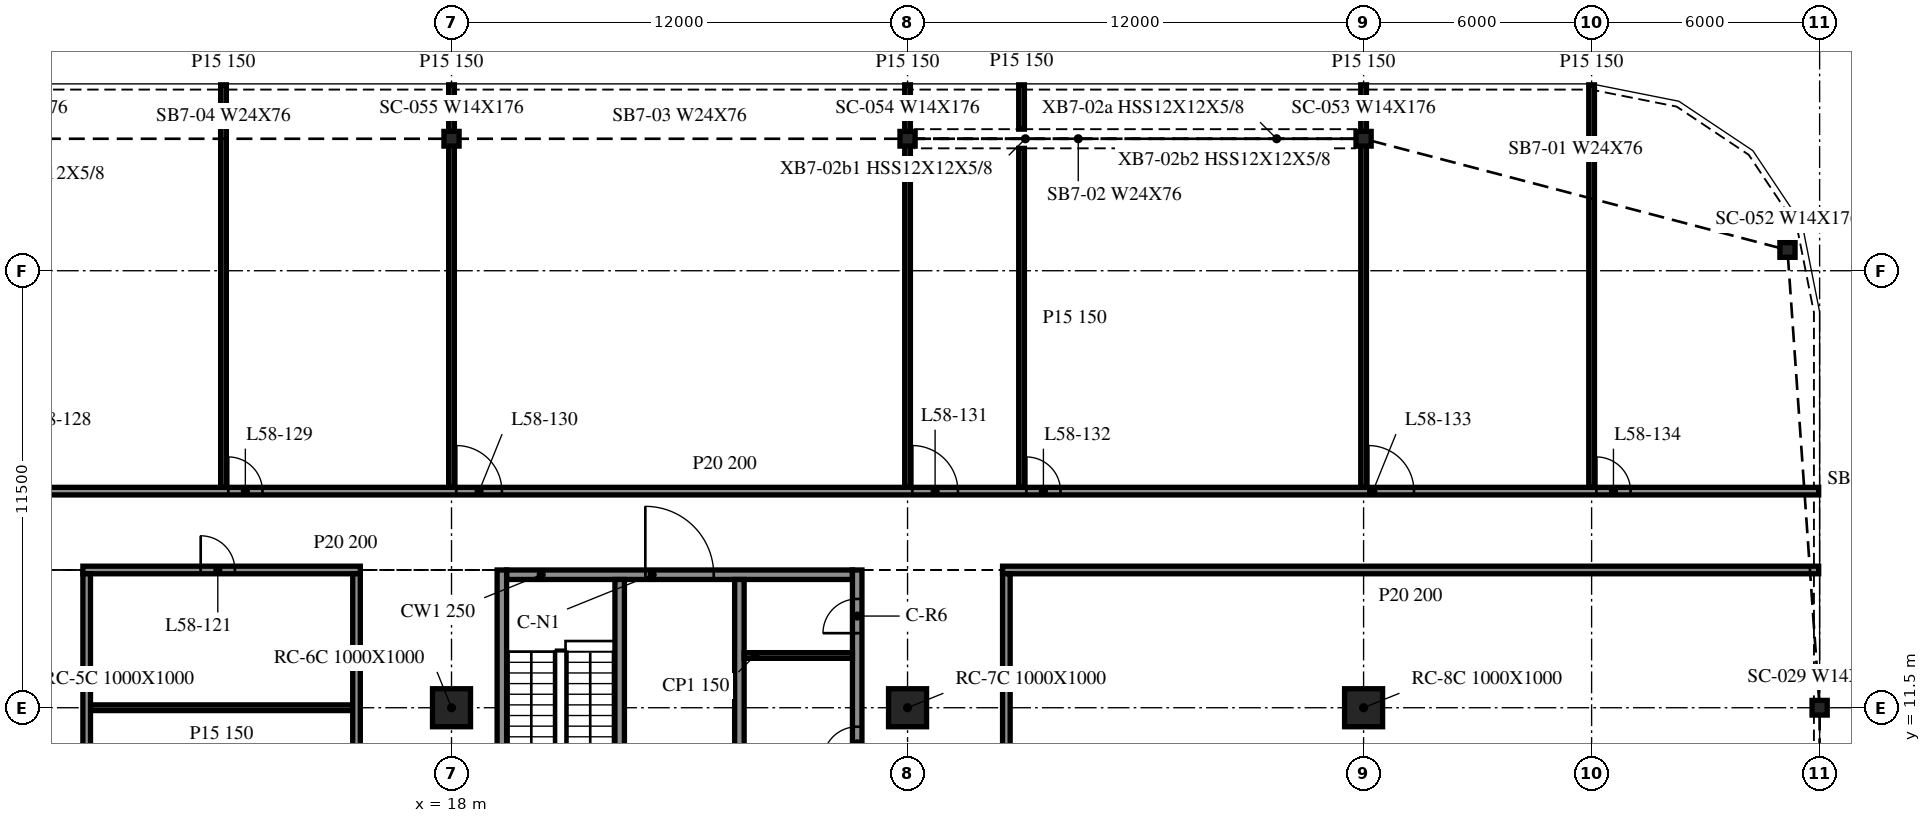
"""IFC4 building model, lengths in metres.
Left out: names, types, materials, properties, quantities, classifications, styles, units other than length and angle.
Written with IfcOpenShell. Run it as: python <this file> out.ifc"""

import sys

from ifc_helpers import new_model, si_unit, direction, frame, frame_2d, origin, origin_2d, place, context, subcontext, project, spatial, rectangle, i_section, extrude, element, fill, save


model = new_model("IFC4")
c1 = context("Model", 3, precision=1e-05, world=origin(), true_north=direction((0.0, 1.0)))
c2 = subcontext(c1, "Body", "Model", "MODEL_VIEW")
j1 = project(units=[si_unit("LENGTHUNIT", "METRE"), si_unit("PLANEANGLEUNIT", "RADIAN")], contexts=[c1])
p1 = place(None, origin())
s1 = spatial("IfcSite", under=j1, at=p1, CompositionType="ELEMENT")
p2 = place(p1, origin())
s2 = spatial("IfcBuilding", under=s1, at=p2, CompositionType="ELEMENT")
p3 = place(p2, frame((0.0, 0.0, 240.0)))
s3 = spatial("IfcBuildingStorey", under=s2, at=p3, CompositionType="ELEMENT", Elevation=240.0)
for number, where, z_axis, x_axis in (
    (1, (18.0, 11.5, -0.34), (0.0, 0.0, 1.0), (1.0, 0.0, 0.0)),
    (2, (30.0, 11.5, -0.34), (0.0, 0.0, 1.0), (1.0, 0.0, 0.0)),
    (3, (42.0, 11.5, -0.34), (0.0, 0.0, 1.0), (1.0, 0.0, 0.0)),
):
    element("IfcColumn", number, at=place(p3, frame(where, z_axis=z_axis, x_axis=x_axis)), inside=s3, PredefinedType="COLUMN", context=c2, shape_type="SweptSolid", body=[
        extrude(rectangle(XDim=1.0, YDim=1.0, at=origin_2d()), origin(), (0.0, 0.0, 1.0), 3.8),
    ])
for number, where, z_axis, x_axis in (
    (4, (53.154, 23.546, -0.34), (0.0, 0.0, 1.0), (1.0, 0.0, 0.0)),
    (5, (42.0, 26.473, -0.34), (0.0, 0.0, 1.0), (1.0, 0.0, 0.0)),
    (6, (30.0, 26.473, -0.34), (0.0, 0.0, 1.0), (1.0, 0.0, 0.0)),
    (7, (18.0, 26.473, -0.34), (0.0, 0.0, 1.0), (1.0, 0.0, 0.0)),
    (8, (54.0, 11.5, -0.34), (0.0, 0.0, 1.0), (1.0, 0.0, 0.0)),
):
    element("IfcColumn", number, at=place(p3, frame(where, z_axis=z_axis, x_axis=x_axis)), inside=s3, PredefinedType="COLUMN", context=c2, shape_type="SweptSolid", body=[
        extrude(i_section(OverallWidth=0.399, OverallDepth=0.386, WebThickness=0.021, FlangeThickness=0.033, at=origin_2d()), origin(), (0.0, 0.0, 1.0), 3.8),
    ])
p4 = place(p3, frame((19.325, 15.125, 0.0), z_axis=(0.0, 0.0, 1.0), x_axis=(0.0, -1.0, 0.0)))
e9 = element("IfcWall", 9, at=p4, inside=s3, PredefinedType="SOLIDWALL", context=c2, shape_type="SweptSolid", body=[
    extrude(rectangle(XDim=24.25, YDim=0.25, at=frame_2d((12.125, 0.0))), origin(), (0.0, 0.0, 1.0), 3.46),
])
p5 = place(p3, frame((28.675, -9.125, 0.0), z_axis=(0.0, 0.0, 1.0), x_axis=(0.0, 1.0, 0.0)))
e10 = element("IfcWall", 10, at=p5, inside=s3, PredefinedType="SOLIDWALL", context=c2, shape_type="SweptSolid", body=[
    extrude(rectangle(XDim=24.25, YDim=0.25, at=frame_2d((12.125, 0.0))), origin(), (0.0, 0.0, 1.0), 3.46),
])
p6 = place(p5, frame((14.425, 0.0, 0.0)))
e11 = element("IfcOpeningElement", 11, at=p6, cuts=e10, PredefinedType="OPENING", context=c2, shape_type="SweptSolid", body=[
    extrude(rectangle(XDim=0.9, YDim=2.1, at=frame_2d((0.45, 1.05))), frame((0.0, 0.135, 0.0), z_axis=(0.0, -1.0, 0.0), x_axis=(1.0, 0.0, 0.0)), (0.0, 0.0, 1.0), 0.27),
])
p7 = place(p5, frame((19.225, 0.0, 0.0)))
e12 = element("IfcOpeningElement", 12, at=p7, cuts=e10, PredefinedType="OPENING", context=c2, shape_type="SweptSolid", body=[
    extrude(rectangle(XDim=0.9, YDim=2.1, at=frame_2d((0.45, 1.05))), frame((0.0, 0.135, 0.0), z_axis=(0.0, -1.0, 0.0), x_axis=(1.0, 0.0, 0.0)), (0.0, 0.0, 1.0), 0.27),
])
p8 = place(p5, frame((22.587, 0.0, 0.0)))
e13 = element("IfcOpeningElement", 13, at=p8, cuts=e10, PredefinedType="OPENING", context=c2, shape_type="SweptSolid", body=[
    extrude(rectangle(XDim=0.9, YDim=2.1, at=frame_2d((0.45, 1.05))), frame((0.0, 0.135, 0.0), z_axis=(0.0, -1.0, 0.0), x_axis=(1.0, 0.0, 0.0)), (0.0, 0.0, 1.0), 0.27),
])
p9 = place(p3, frame((19.45, 15.0, 0.0), z_axis=(0.0, 0.0, 1.0), x_axis=(1.0, 0.0, 0.0)))
e14 = element("IfcWall", 14, at=p9, inside=s3, PredefinedType="SOLIDWALL", context=c2, shape_type="SweptSolid", body=[
    extrude(rectangle(XDim=9.1, YDim=0.25, at=frame_2d((4.55, 0.0))), origin(), (0.0, 0.0, 1.0), 3.46),
])
p10 = place(p9, frame((3.65, 0.0, 0.0)))
e15 = element("IfcOpeningElement", 15, at=p10, cuts=e14, PredefinedType="OPENING", context=c2, shape_type="SweptSolid", body=[
    extrude(rectangle(XDim=1.8, YDim=2.1, at=frame_2d((0.9, 1.05))), frame((0.0, 0.135, 0.0), z_axis=(0.0, -1.0, 0.0), x_axis=(1.0, 0.0, 0.0)), (0.0, 0.0, 1.0), 0.27),
])
p11 = place(p3, frame((22.425, 14.875, 0.0), z_axis=(0.0, 0.0, 1.0), x_axis=(0.0, -1.0, 0.0)))
e16 = element("IfcWall", 16, at=p11, inside=s3, PredefinedType="SOLIDWALL", context=c2, shape_type="SweptSolid", body=[
    extrude(rectangle(XDim=6.25, YDim=0.25, at=frame_2d((3.125, 0.0))), origin(), (0.0, 0.0, 1.0), 3.46),
])
p12 = place(p11, frame((4.85, 0.0, 0.0)))
e17 = element("IfcOpeningElement", 17, at=p12, cuts=e16, PredefinedType="OPENING", context=c2, shape_type="SweptSolid", body=[
    extrude(rectangle(XDim=1.0, YDim=2.1, at=frame_2d((0.5, 1.05))), frame((0.0, 0.135, 0.0), z_axis=(0.0, -1.0, 0.0), x_axis=(1.0, 0.0, 0.0)), (0.0, 0.0, 1.0), 0.27),
])
p13 = place(p3, frame((25.575, 14.875, 0.0), z_axis=(0.0, 0.0, 1.0), x_axis=(0.0, -1.0, 0.0)))
e18 = element("IfcWall", 18, at=p13, inside=s3, PredefinedType="SOLIDWALL", context=c2, shape_type="SweptSolid", body=[
    extrude(rectangle(XDim=17.5, YDim=0.25, at=frame_2d((8.75, 0.0))), origin(), (0.0, 0.0, 1.0), 3.46),
])
p14 = place(p13, frame((15.45, 0.0, 0.0)))
e19 = element("IfcOpeningElement", 19, at=p14, cuts=e18, PredefinedType="OPENING", context=c2, shape_type="SweptSolid", body=[
    extrude(rectangle(XDim=1.1, YDim=2.1, at=frame_2d((0.55, 1.05))), frame((0.0, 0.135, 0.0), z_axis=(0.0, -1.0, 0.0), x_axis=(1.0, 0.0, 0.0)), (0.0, 0.0, 1.0), 0.27),
])
p15 = place(p13, frame((12.8, 0.0, 0.0)))
e20 = element("IfcOpeningElement", 20, at=p15, cuts=e18, PredefinedType="OPENING", context=c2, shape_type="SweptSolid", body=[
    extrude(rectangle(XDim=0.9, YDim=2.1, at=frame_2d((0.45, 1.05))), frame((0.0, 0.135, 0.0), z_axis=(0.0, -1.0, 0.0), x_axis=(1.0, 0.0, 0.0)), (0.0, 0.0, 1.0), 0.27),
])
p16 = place(p3, frame((25.7, 12.875, 0.0), z_axis=(0.0, 0.0, 1.0), x_axis=(1.0, 0.0, 0.0)))
e21 = element("IfcWall", 21, at=p16, inside=s3, PredefinedType="PARTITIONING", context=c2, shape_type="SweptSolid", body=[
    extrude(rectangle(XDim=2.85, YDim=0.15, at=frame_2d((1.425, 0.0))), origin(), (0.0, 0.0, 1.0), 3.46),
])
p17 = place(p3, frame((8.5, 11.5, 0.0), z_axis=(0.0, 0.0, 1.0), x_axis=(1.0, 0.0, 0.0)))
e22 = element("IfcWall", 22, at=p17, inside=s3, PredefinedType="PARTITIONING", context=c2, shape_type="SweptSolid", body=[
    extrude(rectangle(XDim=6.9, YDim=0.15, at=frame_2d((3.45, 0.0))), origin(), (0.0, 0.0, 1.0), 3.46),
])
p18 = place(p3, frame((8.3, 15.125, 0.0), z_axis=(0.0, 0.0, 1.0), x_axis=(1.0, 0.0, 0.0)))
e23 = element("IfcWall", 23, at=p18, inside=s3, PredefinedType="PARTITIONING", context=c2, shape_type="SweptSolid", body=[
    extrude(rectangle(XDim=7.3, YDim=0.2, at=frame_2d((3.65, 0.0))), origin(), (0.0, 0.0, 1.0), 3.46),
])
p19 = place(p18, frame((3.1, 0.0, 0.0)))
e24 = element("IfcOpeningElement", 24, at=p19, cuts=e23, PredefinedType="OPENING", context=c2, shape_type="SweptSolid", body=[
    extrude(rectangle(XDim=0.9, YDim=2.1, at=frame_2d((0.45, 1.05))), frame((0.0, 0.11, 0.0), z_axis=(0.0, -1.0, 0.0), x_axis=(1.0, 0.0, 0.0)), (0.0, 0.0, 1.0), 0.22),
])
p20 = place(p3, frame((32.5, 15.125, 0.0), z_axis=(0.0, 0.0, 1.0), x_axis=(1.0, 0.0, 0.0)))
e25 = element("IfcWall", 25, at=p20, inside=s3, PredefinedType="PARTITIONING", context=c2, shape_type="SweptSolid", body=[
    extrude(rectangle(XDim=21.475, YDim=0.2, at=frame_2d((10.738, 0.0))), origin(), (0.0, 0.0, 1.0), 3.46),
])
p21 = place(p3, frame((-41.975, 17.2, 0.0), z_axis=(0.0, 0.0, 1.0), x_axis=(1.0, 0.0, 0.0)))
e26 = element("IfcWall", 26, at=p21, inside=s3, PredefinedType="PARTITIONING", context=c2, shape_type="SweptSolid", body=[
    extrude(rectangle(XDim=95.95, YDim=0.2, at=frame_2d((47.975, 0.0))), origin(), (0.0, 0.0, 1.0), 3.46),
])
p22 = place(p21, frame((10.7, 0.0, 0.0)))
e27 = element("IfcOpeningElement", 27, at=p22, cuts=e26, PredefinedType="OPENING", context=c2, shape_type="SweptSolid", body=[
    extrude(rectangle(XDim=0.9, YDim=2.1, at=frame_2d((0.45, 1.05))), frame((0.0, 0.11, 0.0), z_axis=(0.0, -1.0, 0.0), x_axis=(1.0, 0.0, 0.0)), (0.0, 0.0, 1.0), 0.22),
])
p23 = place(p21, frame((13.3, 0.0, 0.0)))
e28 = element("IfcOpeningElement", 28, at=p23, cuts=e26, PredefinedType="OPENING", context=c2, shape_type="SweptSolid", body=[
    extrude(rectangle(XDim=1.2, YDim=2.1, at=frame_2d((0.6, 1.05))), frame((0.0, 0.11, 0.0), z_axis=(0.0, -1.0, 0.0), x_axis=(1.0, 0.0, 0.0)), (0.0, 0.0, 1.0), 0.22),
])
p24 = place(p21, frame((22.7, 0.0, 0.0)))
e29 = element("IfcOpeningElement", 29, at=p24, cuts=e26, PredefinedType="OPENING", context=c2, shape_type="SweptSolid", body=[
    extrude(rectangle(XDim=0.9, YDim=2.1, at=frame_2d((0.45, 1.05))), frame((0.0, 0.11, 0.0), z_axis=(0.0, -1.0, 0.0), x_axis=(1.0, 0.0, 0.0)), (0.0, 0.0, 1.0), 0.22),
])
p25 = place(p21, frame((28.3, 0.0, 0.0)))
e30 = element("IfcOpeningElement", 30, at=p25, cuts=e26, PredefinedType="OPENING", context=c2, shape_type="SweptSolid", body=[
    extrude(rectangle(XDim=1.2, YDim=2.1, at=frame_2d((0.6, 1.05))), frame((0.0, 0.11, 0.0), z_axis=(0.0, -1.0, 0.0), x_axis=(1.0, 0.0, 0.0)), (0.0, 0.0, 1.0), 0.22),
])
p26 = place(p21, frame((40.3, 0.0, 0.0)))
e31 = element("IfcOpeningElement", 31, at=p26, cuts=e26, PredefinedType="OPENING", context=c2, shape_type="SweptSolid", body=[
    extrude(rectangle(XDim=1.2, YDim=2.1, at=frame_2d((0.6, 1.05))), frame((0.0, 0.11, 0.0), z_axis=(0.0, -1.0, 0.0), x_axis=(1.0, 0.0, 0.0)), (0.0, 0.0, 1.0), 0.22),
])
p27 = place(p21, frame((43.7, 0.0, 0.0)))
e32 = element("IfcOpeningElement", 32, at=p27, cuts=e26, PredefinedType="OPENING", context=c2, shape_type="SweptSolid", body=[
    extrude(rectangle(XDim=0.9, YDim=2.1, at=frame_2d((0.45, 1.05))), frame((0.0, 0.11, 0.0), z_axis=(0.0, -1.0, 0.0), x_axis=(1.0, 0.0, 0.0)), (0.0, 0.0, 1.0), 0.22),
])
p28 = place(p21, frame((47.3, 0.0, 0.0)))
e33 = element("IfcOpeningElement", 33, at=p28, cuts=e26, PredefinedType="OPENING", context=c2, shape_type="SweptSolid", body=[
    extrude(rectangle(XDim=1.2, YDim=2.1, at=frame_2d((0.6, 1.05))), frame((0.0, 0.11, 0.0), z_axis=(0.0, -1.0, 0.0), x_axis=(1.0, 0.0, 0.0)), (0.0, 0.0, 1.0), 0.22),
])
p29 = place(p21, frame((54.1, 0.0, 0.0)))
e34 = element("IfcOpeningElement", 34, at=p29, cuts=e26, PredefinedType="OPENING", context=c2, shape_type="SweptSolid", body=[
    extrude(rectangle(XDim=0.9, YDim=2.1, at=frame_2d((0.45, 1.05))), frame((0.0, 0.11, 0.0), z_axis=(0.0, -1.0, 0.0), x_axis=(1.0, 0.0, 0.0)), (0.0, 0.0, 1.0), 0.22),
])
p30 = place(p21, frame((60.1, 0.0, 0.0)))
e35 = element("IfcOpeningElement", 35, at=p30, cuts=e26, PredefinedType="OPENING", context=c2, shape_type="SweptSolid", body=[
    extrude(rectangle(XDim=1.2, YDim=2.1, at=frame_2d((0.6, 1.05))), frame((0.0, 0.11, 0.0), z_axis=(0.0, -1.0, 0.0), x_axis=(1.0, 0.0, 0.0)), (0.0, 0.0, 1.0), 0.22),
])
p31 = place(p21, frame((72.1, 0.0, 0.0)))
e36 = element("IfcOpeningElement", 36, at=p31, cuts=e26, PredefinedType="OPENING", context=c2, shape_type="SweptSolid", body=[
    extrude(rectangle(XDim=1.2, YDim=2.1, at=frame_2d((0.6, 1.05))), frame((0.0, 0.11, 0.0), z_axis=(0.0, -1.0, 0.0), x_axis=(1.0, 0.0, 0.0)), (0.0, 0.0, 1.0), 0.22),
])
p32 = place(p21, frame((75.1, 0.0, 0.0)))
e37 = element("IfcOpeningElement", 37, at=p32, cuts=e26, PredefinedType="OPENING", context=c2, shape_type="SweptSolid", body=[
    extrude(rectangle(XDim=0.9, YDim=2.1, at=frame_2d((0.45, 1.05))), frame((0.0, 0.11, 0.0), z_axis=(0.0, -1.0, 0.0), x_axis=(1.0, 0.0, 0.0)), (0.0, 0.0, 1.0), 0.22),
])
p33 = place(p21, frame((84.1, 0.0, 0.0)))
e38 = element("IfcOpeningElement", 38, at=p33, cuts=e26, PredefinedType="OPENING", context=c2, shape_type="SweptSolid", body=[
    extrude(rectangle(XDim=1.2, YDim=2.1, at=frame_2d((0.6, 1.05))), frame((0.0, 0.11, 0.0), z_axis=(0.0, -1.0, 0.0), x_axis=(1.0, 0.0, 0.0)), (0.0, 0.0, 1.0), 0.22),
])
p34 = place(p21, frame((90.1, 0.0, 0.0)))
e39 = element("IfcOpeningElement", 39, at=p34, cuts=e26, PredefinedType="OPENING", context=c2, shape_type="SweptSolid", body=[
    extrude(rectangle(XDim=0.9, YDim=2.1, at=frame_2d((0.45, 1.05))), frame((0.0, 0.11, 0.0), z_axis=(0.0, -1.0, 0.0), x_axis=(1.0, 0.0, 0.0)), (0.0, 0.0, 1.0), 0.22),
])
p35 = place(p3, frame((8.4, -9.025, 0.0), z_axis=(0.0, 0.0, 1.0), x_axis=(0.0, 1.0, 0.0)))
e40 = element("IfcWall", 40, at=p35, inside=s3, PredefinedType="PARTITIONING", context=c2, shape_type="SweptSolid", body=[
    extrude(rectangle(XDim=24.05, YDim=0.2, at=frame_2d((12.025, 0.0))), origin(), (0.0, 0.0, 1.0), 3.46),
])
p36 = place(p35, frame((11.5, 0.0, 0.0)))
e41 = element("IfcOpeningElement", 41, at=p36, cuts=e40, PredefinedType="OPENING", context=c2, shape_type="SweptSolid", body=[
    extrude(rectangle(XDim=0.9, YDim=2.1, at=frame_2d((0.45, 1.05))), frame((0.0, 0.11, 0.0), z_axis=(0.0, -1.0, 0.0), x_axis=(1.0, 0.0, 0.0)), (0.0, 0.0, 1.0), 0.22),
])
p37 = place(p3, frame((12.0, 17.3, 0.0), z_axis=(0.0, 0.0, 1.0), x_axis=(0.0, 1.0, 0.0)))
e42 = element("IfcWall", 42, at=p37, inside=s3, PredefinedType="PARTITIONING", context=c2, shape_type="SweptSolid", body=[
    extrude(rectangle(XDim=10.592, YDim=0.15, at=frame_2d((5.296, 0.0))), origin(), (0.0, 0.0, 1.0), 3.46),
])
p38 = place(p3, frame((15.5, -9.025, 0.0), z_axis=(0.0, 0.0, 1.0), x_axis=(0.0, 1.0, 0.0)))
e43 = element("IfcWall", 43, at=p38, inside=s3, PredefinedType="PARTITIONING", context=c2, shape_type="SweptSolid", body=[
    extrude(rectangle(XDim=24.05, YDim=0.2, at=frame_2d((12.025, 0.0))), origin(), (0.0, 0.0, 1.0), 3.46),
])
for number, where, z_axis, x_axis in (
    (44, (18.0, 17.3, 0.0), (0.0, 0.0, 1.0), (0.0, 1.0, 0.0)),
    (45, (30.0, 17.3, 0.0), (0.0, 0.0, 1.0), (0.0, 1.0, 0.0)),
):
    element("IfcWall", number, at=place(p3, frame(where, z_axis=z_axis, x_axis=x_axis)), inside=s3, PredefinedType="PARTITIONING", context=c2, shape_type="SweptSolid", body=[
        extrude(rectangle(XDim=10.592, YDim=0.15, at=frame_2d((5.296, 0.0))), origin(), (0.0, 0.0, 1.0), 3.46),
    ])
p39 = place(p3, frame((32.6, -9.025, 0.0), z_axis=(0.0, 0.0, 1.0), x_axis=(0.0, 1.0, 0.0)))
e46 = element("IfcWall", 46, at=p39, inside=s3, PredefinedType="PARTITIONING", context=c2, shape_type="SweptSolid", body=[
    extrude(rectangle(XDim=24.05, YDim=0.2, at=frame_2d((12.025, 0.0))), origin(), (0.0, 0.0, 1.0), 3.46),
])
p40 = place(p39, frame((11.5, 0.0, 0.0)))
e47 = element("IfcOpeningElement", 47, at=p40, cuts=e46, PredefinedType="OPENING", context=c2, shape_type="SweptSolid", body=[
    extrude(rectangle(XDim=1.0, YDim=2.1, at=frame_2d((0.5, 1.05))), frame((0.0, 0.11, 0.0), z_axis=(0.0, -1.0, 0.0), x_axis=(1.0, 0.0, 0.0)), (0.0, 0.0, 1.0), 0.22),
])
p41 = place(p3, frame((33.0, 17.3, 0.0), z_axis=(0.0, 0.0, 1.0), x_axis=(0.0, 1.0, 0.0)))
e48 = element("IfcWall", 48, at=p41, inside=s3, PredefinedType="PARTITIONING", context=c2, shape_type="SweptSolid", body=[
    extrude(rectangle(XDim=8.921, YDim=0.15, at=frame_2d((4.46, 0.0))), origin(), (0.0, 0.0, 1.0), 3.46),
])
p42 = place(p3, frame((33.0, 26.725, 0.0), z_axis=(0.0, 0.0, 1.0), x_axis=(0.0, 1.0, 0.0)))
e49 = element("IfcWall", 49, at=p42, inside=s3, PredefinedType="PARTITIONING", context=c2, shape_type="SweptSolid", body=[
    extrude(rectangle(XDim=1.167, YDim=0.15, at=frame_2d((0.583, 0.0))), origin(), (0.0, 0.0, 1.0), 3.46),
])
for number, where, z_axis, x_axis in (
    (50, (42.0, 17.3, 0.0), (0.0, 0.0, 1.0), (0.0, 1.0, 0.0)),
    (51, (48.0, 17.3, 0.0), (0.0, 0.0, 1.0), (0.0, 1.0, 0.0)),
):
    element("IfcWall", number, at=place(p3, frame(where, z_axis=z_axis, x_axis=x_axis)), inside=s3, PredefinedType="PARTITIONING", context=c2, shape_type="SweptSolid", body=[
        extrude(rectangle(XDim=10.592, YDim=0.15, at=frame_2d((5.296, 0.0))), origin(), (0.0, 0.0, 1.0), 3.46),
    ])
p43 = place(p10, origin())
e52 = element("IfcDoor", 52, at=p43, inside=s3, OperationType="DOUBLE_DOOR_SINGLE_SWING", PredefinedType="DOOR", context=c2, shape_type="SweptSolid", body=[
    extrude(rectangle(XDim=1.8, YDim=2.1, at=frame_2d((0.9, 1.05))), frame((0.0, 0.025, 0.0), z_axis=(0.0, -1.0, 0.0), x_axis=(1.0, 0.0, 0.0)), (0.0, 0.0, 1.0), 0.05),
])
fill(e15, e52)
p44 = place(p7, origin())
e53 = element("IfcDoor", 53, at=p44, inside=s3, OperationType="SINGLE_SWING_LEFT", PredefinedType="DOOR", context=c2, shape_type="SweptSolid", body=[
    extrude(rectangle(XDim=0.9, YDim=2.1, at=frame_2d((0.45, 1.05))), frame((0.0, 0.025, 0.0), z_axis=(0.0, -1.0, 0.0), x_axis=(1.0, 0.0, 0.0)), (0.0, 0.0, 1.0), 0.05),
])
fill(e12, e53)
p45 = place(p8, origin())
e54 = element("IfcDoor", 54, at=p45, inside=s3, OperationType="SINGLE_SWING_RIGHT", PredefinedType="DOOR", context=c2, shape_type="SweptSolid", body=[
    extrude(rectangle(XDim=0.9, YDim=2.1, at=frame_2d((0.45, 1.05))), frame((0.0, 0.025, 0.0), z_axis=(0.0, -1.0, 0.0), x_axis=(1.0, 0.0, 0.0)), (0.0, 0.0, 1.0), 0.05),
])
fill(e13, e54)
p46 = place(p19, origin())
e55 = element("IfcDoor", 55, at=p46, inside=s3, OperationType="SINGLE_SWING_RIGHT", PredefinedType="DOOR", context=c2, shape_type="SweptSolid", body=[
    extrude(rectangle(XDim=0.9, YDim=2.1, at=frame_2d((0.45, 1.05))), frame((0.0, 0.025, 0.0), z_axis=(0.0, -1.0, 0.0), x_axis=(1.0, 0.0, 0.0)), (0.0, 0.0, 1.0), 0.05),
])
fill(e24, e55)
p47 = place(p29, origin())
e56 = element("IfcDoor", 56, at=p47, inside=s3, OperationType="SINGLE_SWING_RIGHT", PredefinedType="DOOR", context=c2, shape_type="SweptSolid", body=[
    extrude(rectangle(XDim=0.9, YDim=2.1, at=frame_2d((0.45, 1.05))), frame((0.0, 0.025, 0.0), z_axis=(0.0, -1.0, 0.0), x_axis=(1.0, 0.0, 0.0)), (0.0, 0.0, 1.0), 0.05),
])
fill(e34, e56)
p48 = place(p30, origin())
e57 = element("IfcDoor", 57, at=p48, inside=s3, OperationType="SINGLE_SWING_RIGHT", PredefinedType="DOOR", context=c2, shape_type="SweptSolid", body=[
    extrude(rectangle(XDim=1.2, YDim=2.1, at=frame_2d((0.6, 1.05))), frame((0.0, 0.025, 0.0), z_axis=(0.0, -1.0, 0.0), x_axis=(1.0, 0.0, 0.0)), (0.0, 0.0, 1.0), 0.05),
])
fill(e35, e57)
p49 = place(p31, origin())
e58 = element("IfcDoor", 58, at=p49, inside=s3, OperationType="SINGLE_SWING_RIGHT", PredefinedType="DOOR", context=c2, shape_type="SweptSolid", body=[
    extrude(rectangle(XDim=1.2, YDim=2.1, at=frame_2d((0.6, 1.05))), frame((0.0, 0.025, 0.0), z_axis=(0.0, -1.0, 0.0), x_axis=(1.0, 0.0, 0.0)), (0.0, 0.0, 1.0), 0.05),
])
fill(e36, e58)
p50 = place(p32, origin())
e59 = element("IfcDoor", 59, at=p50, inside=s3, OperationType="SINGLE_SWING_RIGHT", PredefinedType="DOOR", context=c2, shape_type="SweptSolid", body=[
    extrude(rectangle(XDim=0.9, YDim=2.1, at=frame_2d((0.45, 1.05))), frame((0.0, 0.025, 0.0), z_axis=(0.0, -1.0, 0.0), x_axis=(1.0, 0.0, 0.0)), (0.0, 0.0, 1.0), 0.05),
])
fill(e37, e59)
p51 = place(p33, origin())
e60 = element("IfcDoor", 60, at=p51, inside=s3, OperationType="SINGLE_SWING_RIGHT", PredefinedType="DOOR", context=c2, shape_type="SweptSolid", body=[
    extrude(rectangle(XDim=1.2, YDim=2.1, at=frame_2d((0.6, 1.05))), frame((0.0, 0.025, 0.0), z_axis=(0.0, -1.0, 0.0), x_axis=(1.0, 0.0, 0.0)), (0.0, 0.0, 1.0), 0.05),
])
fill(e38, e60)
p52 = place(p34, origin())
e61 = element("IfcDoor", 61, at=p52, inside=s3, OperationType="SINGLE_SWING_RIGHT", PredefinedType="DOOR", context=c2, shape_type="SweptSolid", body=[
    extrude(rectangle(XDim=0.9, YDim=2.1, at=frame_2d((0.45, 1.05))), frame((0.0, 0.025, 0.0), z_axis=(0.0, -1.0, 0.0), x_axis=(1.0, 0.0, 0.0)), (0.0, 0.0, 1.0), 0.05),
])
fill(e39, e61)
save(model, sys.argv[1])
